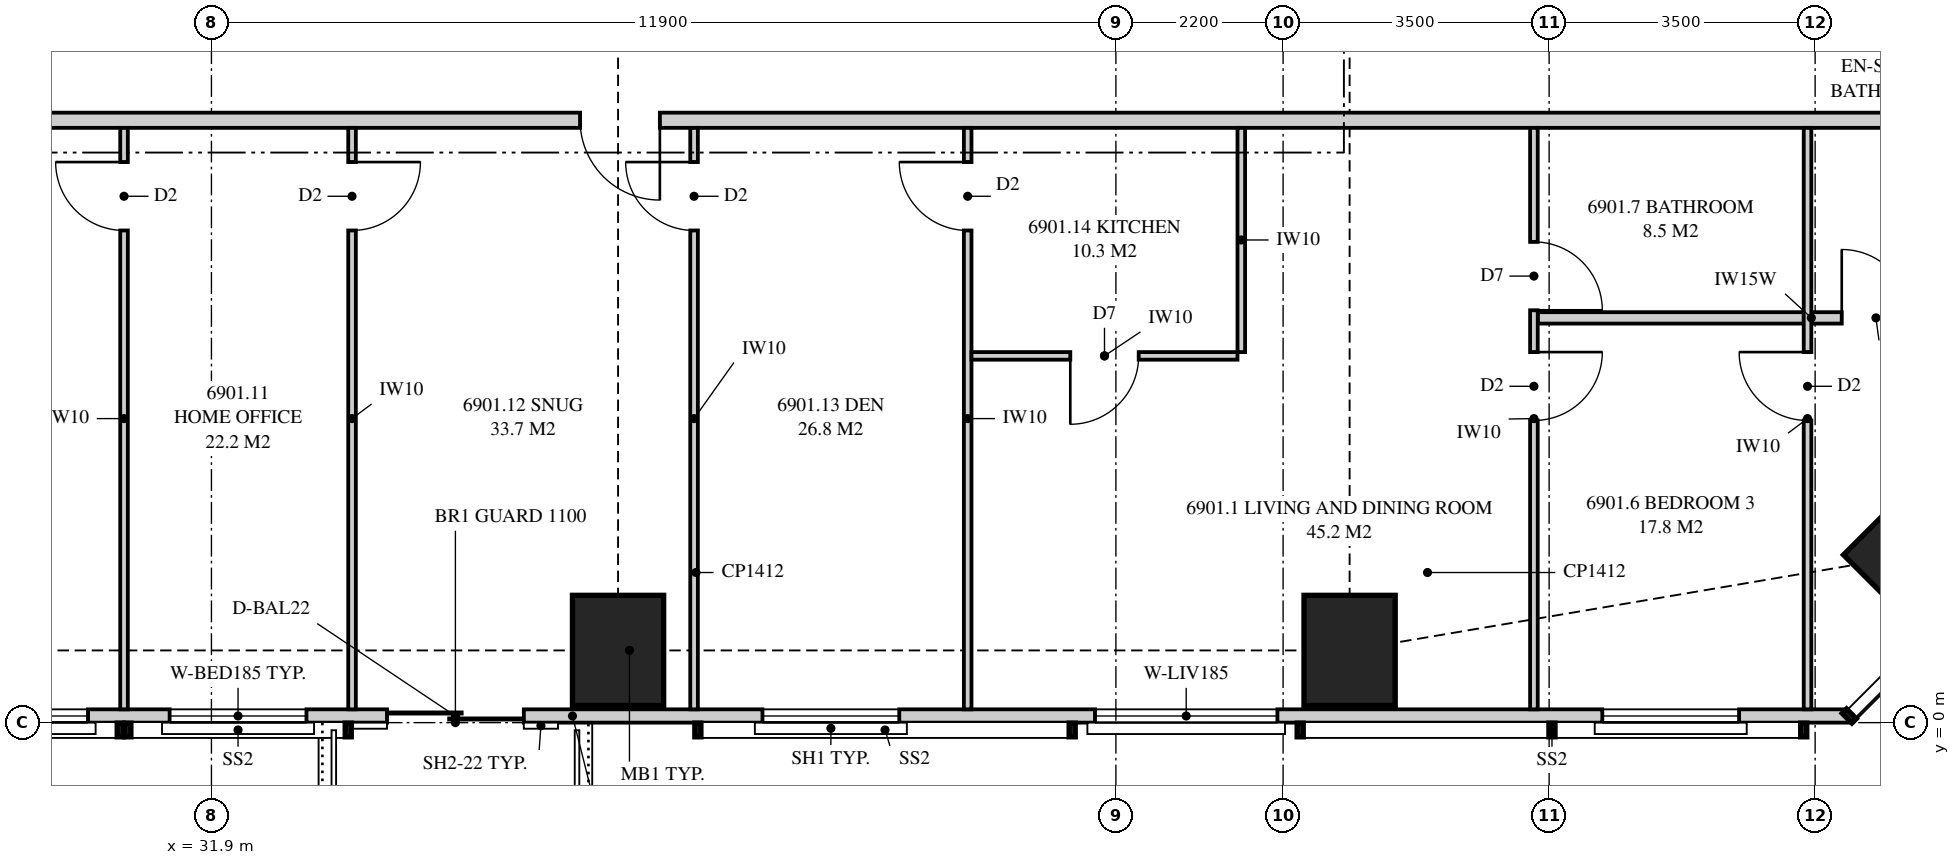
"""IFC4 building model, lengths in metres.
Left out: names, types, materials, properties, quantities, classifications, styles, units other than length and angle.
Written with IfcOpenShell. Run it as: python <this file> out.ifc"""

import sys

from ifc_helpers import new_model, si_unit, direction, frame, frame_2d, origin, origin_2d, place, context, subcontext, project, spatial, polyline, rectangle, outline, extrude, element, fill, save


model = new_model("IFC4")
c1 = context("Model", 3, precision=1e-05, world=origin(), true_north=direction((0.0, 1.0)))
c2 = subcontext(c1, "Body", "Model", "MODEL_VIEW")
j1 = project(units=[si_unit("LENGTHUNIT", "METRE"), si_unit("PLANEANGLEUNIT", "RADIAN")], contexts=[c1])
p1 = place(None, origin())
s1 = spatial("IfcSite", under=j1, at=p1, CompositionType="ELEMENT")
p2 = place(p1, origin())
s2 = spatial("IfcBuilding", under=s1, at=p2, CompositionType="ELEMENT")
p3 = place(p2, frame((0.0, 0.0, 252.95)))
s3 = spatial("IfcBuildingStorey", under=s2, at=p3, CompositionType="ELEMENT", Elevation=252.95)
for number, where, z_axis, x_axis in (
    (1, (37.25, 0.95, 0.0), (0.0, 0.0, 1.0), (0.0, 1.0, 0.0)),
    (2, (46.875, 0.95, 0.0), (0.0, 0.0, 1.0), (0.0, 1.0, 0.0)),
):
    element("IfcColumn", number, at=place(p3, frame(where, z_axis=z_axis, x_axis=x_axis)), inside=s3, PredefinedType="COLUMN", context=c2, shape_type="SweptSolid", body=[
        extrude(rectangle(XDim=1.45, YDim=1.2, at=origin_2d()), origin(), (0.0, 0.0, 1.0), 3.5),
    ])
p4 = place(p3, frame((54.293, 2.207, 0.0), z_axis=(0.0, 0.0, 1.0), x_axis=(0.707106781187, 0.707106781187, 0.0)))
e3 = element("IfcColumn", 3, at=p4, inside=s3, PredefinedType="COLUMN", context=c2, shape_type="SweptSolid", body=[
    extrude(rectangle(XDim=1.3, YDim=1.3, at=origin_2d()), origin(), (0.0, 0.0, 1.0), 3.5),
])
p5 = place(p3, frame((19.851, 0.087, 0.0), z_axis=(0.0, 0.0, 1.0), x_axis=(1.0, 0.0, 0.0)))
e4 = element("IfcWall", 4, at=p5, inside=s3, PredefinedType="SOLIDWALL", context=c2, shape_type="SweptSolid", body=[
    extrude(outline(polyline([(0.0, 0.0), (33.597, 0.0), (33.597, 3.26), (27.239, 3.26), (27.239, 2.3), (27.155, 2.3), (27.155, 3.26), (27.024, 3.26), (27.024, 2.3), (7.774, 2.3), (7.774, 3.26), (7.642, 3.26), (7.642, 2.3), (7.559, 2.3), (7.559, 3.26), (0.0, 3.26), (0.0, 0.0)])), frame((0.0, 0.087, 0.0), z_axis=(0.0, -1.0, 0.0), x_axis=(1.0, 0.0, 0.0)), (0.0, 0.0, 1.0), 0.175),
])
p6 = place(p5, frame((2.649, 0.0, 0.4)))
e5 = element("IfcOpeningElement", 5, at=p6, cuts=e4, PredefinedType="OPENING", context=c2, shape_type="SweptSolid", body=[
    extrude(rectangle(XDim=1.8, YDim=1.85, at=frame_2d((0.9, 0.925))), frame((0.0, 0.097, 0.0), z_axis=(0.0, -1.0, 0.0), x_axis=(1.0, 0.0, 0.0)), (0.0, 0.0, 1.0), 0.195),
])
p7 = place(p5, frame((8.625, 0.0, 0.4)))
e6 = element("IfcOpeningElement", 6, at=p7, cuts=e4, PredefinedType="OPENING", context=c2, shape_type="SweptSolid", body=[
    extrude(rectangle(XDim=1.8, YDim=1.85, at=frame_2d((0.9, 0.925))), frame((0.0, 0.097, 0.0), z_axis=(0.0, -1.0, 0.0), x_axis=(1.0, 0.0, 0.0)), (0.0, 0.0, 1.0), 0.195),
])
p8 = place(p5, frame((11.499, 0.0, 0.4)))
e7 = element("IfcOpeningElement", 7, at=p8, cuts=e4, PredefinedType="OPENING", context=c2, shape_type="SweptSolid", body=[
    extrude(rectangle(XDim=1.8, YDim=1.85, at=frame_2d((0.9, 0.925))), frame((0.0, 0.097, 0.0), z_axis=(0.0, -1.0, 0.0), x_axis=(1.0, 0.0, 0.0)), (0.0, 0.0, 1.0), 0.195),
])
p9 = place(p5, frame((14.359, 0.0, 0.0)))
e8 = element("IfcOpeningElement", 8, at=p9, cuts=e4, PredefinedType="OPENING", context=c2, shape_type="SweptSolid", body=[
    extrude(rectangle(XDim=1.8, YDim=2.25, at=frame_2d((0.9, 1.125))), frame((0.0, 0.097, 0.0), z_axis=(0.0, -1.0, 0.0), x_axis=(1.0, 0.0, 0.0)), (0.0, 0.0, 1.0), 0.195),
])
p10 = place(p5, frame((19.299, 0.0, 0.4)))
e9 = element("IfcOpeningElement", 9, at=p10, cuts=e4, PredefinedType="OPENING", context=c2, shape_type="SweptSolid", body=[
    extrude(rectangle(XDim=1.8, YDim=1.85, at=frame_2d((0.9, 0.925))), frame((0.0, 0.097, 0.0), z_axis=(0.0, -1.0, 0.0), x_axis=(1.0, 0.0, 0.0)), (0.0, 0.0, 1.0), 0.195),
])
p11 = place(p5, frame((23.674, 0.0, 0.4)))
e10 = element("IfcOpeningElement", 10, at=p11, cuts=e4, PredefinedType="OPENING", context=c2, shape_type="SweptSolid", body=[
    extrude(rectangle(XDim=2.4, YDim=1.85, at=frame_2d((1.2, 0.925))), frame((0.0, 0.097, 0.0), z_axis=(0.0, -1.0, 0.0), x_axis=(1.0, 0.0, 0.0)), (0.0, 0.0, 1.0), 0.195),
])
p12 = place(p5, frame((30.349, 0.0, 0.4)))
e11 = element("IfcOpeningElement", 11, at=p12, cuts=e4, PredefinedType="OPENING", context=c2, shape_type="SweptSolid", body=[
    extrude(rectangle(XDim=1.8, YDim=1.85, at=frame_2d((0.9, 0.925))), frame((0.0, 0.097, 0.0), z_axis=(0.0, -1.0, 0.0), x_axis=(1.0, 0.0, 0.0)), (0.0, 0.0, 1.0), 0.195),
])
p13 = place(p3, frame((18.0, 7.925, 0.0), z_axis=(0.0, 0.0, 1.0), x_axis=(1.0, 0.0, 0.0)))
e12 = element("IfcWall", 12, at=p13, inside=s3, PredefinedType="PARTITIONING", context=c2, shape_type="SweptSolid", body=[
    extrude(outline(polyline([(0.0, 0.0), (38.325, 0.0), (38.325, 3.26), (37.875, 3.26), (37.875, 2.3), (36.043, 2.3), (36.043, 3.26), (30.185, 3.26), (30.185, 2.66), (27.565, 2.66), (27.565, 3.26), (20.56, 3.26), (20.56, 2.66), (17.94, 2.66), (17.94, 3.26), (10.935, 3.26), (10.935, 2.66), (8.315, 2.66), (8.315, 3.26), (1.839, 3.26), (1.839, 2.3), (0.0, 2.3), (0.0, 3.26), (0.0, 0.0)])), frame((0.0, 0.1, 0.0), z_axis=(0.0, -1.0, 0.0), x_axis=(1.0, 0.0, 0.0)), (0.0, 0.0, 1.0), 0.2),
])
p14 = place(p13, frame((18.75, 0.0, 0.0)))
e13 = element("IfcOpeningElement", 13, at=p14, cuts=e12, PredefinedType="OPENING", context=c2, shape_type="SweptSolid", body=[
    extrude(rectangle(XDim=1.05, YDim=2.2, at=frame_2d((0.525, 1.1))), frame((0.0, 0.11, 0.0), z_axis=(0.0, -1.0, 0.0), x_axis=(1.0, 0.0, 0.0)), (0.0, 0.0, 1.0), 0.22),
])
p15 = place(p3, frame((49.3, 0.175, 0.0), z_axis=(0.0, 0.0, 1.0), x_axis=(0.0, 1.0, 0.0)))
e14 = element("IfcWall", 14, at=p15, inside=s3, PredefinedType="PARTITIONING", context=c2, shape_type="SweptSolid", body=[
    extrude(outline(polyline([(0.0, 0.0), (7.65, 0.0), (7.65, 3.26), (2.058, 3.26), (2.058, 2.3), (0.314, 2.3), (0.314, 3.26), (0.0, 3.26), (0.0, 0.0)])), frame((0.0, 0.05, 0.0), z_axis=(0.0, -1.0, 0.0), x_axis=(1.0, 0.0, 0.0)), (0.0, 0.0, 1.0), 0.1),
])
p16 = place(p15, frame((3.8, 0.0, 0.0)))
e15 = element("IfcOpeningElement", 15, at=p16, cuts=e14, PredefinedType="OPENING", context=c2, shape_type="SweptSolid", body=[
    extrude(rectangle(XDim=0.9, YDim=2.1, at=frame_2d((0.45, 1.05))), frame((0.0, 0.06, 0.0), z_axis=(0.0, -1.0, 0.0), x_axis=(1.0, 0.0, 0.0)), (0.0, 0.0, 1.0), 0.12),
])
p17 = place(p15, frame((5.25, 0.0, 0.0)))
e16 = element("IfcOpeningElement", 16, at=p17, cuts=e14, PredefinedType="OPENING", context=c2, shape_type="SweptSolid", body=[
    extrude(rectangle(XDim=0.9, YDim=2.1, at=frame_2d((0.45, 1.05))), frame((0.0, 0.06, 0.0), z_axis=(0.0, -1.0, 0.0), x_axis=(1.0, 0.0, 0.0)), (0.0, 0.0, 1.0), 0.12),
])
p18 = place(p3, frame((52.9, 0.175, 0.0), z_axis=(0.0, 0.0, 1.0), x_axis=(0.0, 1.0, 0.0)))
e17 = element("IfcWall", 17, at=p18, inside=s3, PredefinedType="PARTITIONING", context=c2, shape_type="SweptSolid", body=[
    extrude(outline(polyline([(0.0, 0.0), (7.65, 0.0), (7.65, 3.26), (2.668, 3.26), (2.668, 2.3), (0.924, 2.3), (0.924, 3.26), (0.0, 3.26), (0.0, 0.0)])), frame((0.0, 0.05, 0.0), z_axis=(0.0, -1.0, 0.0), x_axis=(1.0, 0.0, 0.0)), (0.0, 0.0, 1.0), 0.1),
])
p19 = place(p18, frame((3.8, 0.0, 0.0)))
e18 = element("IfcOpeningElement", 18, at=p19, cuts=e17, PredefinedType="OPENING", context=c2, shape_type="SweptSolid", body=[
    extrude(rectangle(XDim=0.9, YDim=2.1, at=frame_2d((0.45, 1.05))), frame((0.0, 0.06, 0.0), z_axis=(0.0, -1.0, 0.0), x_axis=(1.0, 0.0, 0.0)), (0.0, 0.0, 1.0), 0.12),
])
p20 = place(p3, frame((49.35, 5.325, 0.0), z_axis=(0.0, 0.0, 1.0), x_axis=(1.0, 0.0, 0.0)))
e19 = element("IfcWall", 19, at=p20, inside=s3, PredefinedType="PLUMBINGWALL", context=c2, shape_type="SweptSolid", body=[
    extrude(rectangle(XDim=3.5, YDim=0.15, at=frame_2d((1.75, 0.0))), origin(), (0.0, 0.0, 1.0), 3.26),
])
p21 = place(p3, frame((52.95, 5.325, 0.0), z_axis=(0.0, 0.0, 1.0), x_axis=(1.0, 0.0, 0.0)))
e20 = element("IfcWall", 20, at=p21, inside=s3, PredefinedType="PLUMBINGWALL", context=c2, shape_type="SweptSolid", body=[
    extrude(outline(polyline([(0.0, 0.0), (3.55, 0.0), (3.55, 3.26), (2.597, 3.26), (2.597, 2.3), (0.815, 2.3), (0.815, 3.26), (0.0, 3.26), (0.0, 0.0)])), frame((0.0, 0.075, 0.0), z_axis=(0.0, -1.0, 0.0), x_axis=(1.0, 0.0, 0.0)), (0.0, 0.0, 1.0), 0.15),
])
p22 = place(p21, frame((0.4, 0.0, 0.0)))
e21 = element("IfcOpeningElement", 21, at=p22, cuts=e20, PredefinedType="OPENING", context=c2, shape_type="SweptSolid", body=[
    extrude(rectangle(XDim=0.9, YDim=2.1, at=frame_2d((0.45, 1.05))), frame((0.0, 0.085, 0.0), z_axis=(0.0, -1.0, 0.0), x_axis=(1.0, 0.0, 0.0)), (0.0, 0.0, 1.0), 0.17),
])
p23 = place(p3, frame((30.75, 0.175, 0.0), z_axis=(0.0, 0.0, 1.0), x_axis=(0.0, 1.0, 0.0)))
e22 = element("IfcWall", 22, at=p23, inside=s3, PredefinedType="PARTITIONING", context=c2, shape_type="SweptSolid", body=[
    extrude(outline(polyline([(0.0, 0.0), (7.65, 0.0), (7.65, 3.26), (1.635, 3.26), (1.635, 2.3), (0.0, 2.3), (0.0, 3.26), (0.0, 0.0)])), frame((0.0, 0.05, 0.0), z_axis=(0.0, -1.0, 0.0), x_axis=(1.0, 0.0, 0.0)), (0.0, 0.0, 1.0), 0.1),
])
p24 = place(p23, frame((6.3, 0.0, 0.0)))
e23 = element("IfcOpeningElement", 23, at=p24, cuts=e22, PredefinedType="OPENING", context=c2, shape_type="SweptSolid", body=[
    extrude(rectangle(XDim=0.9, YDim=2.1, at=frame_2d((0.45, 1.05))), frame((0.0, 0.06, 0.0), z_axis=(0.0, -1.0, 0.0), x_axis=(1.0, 0.0, 0.0)), (0.0, 0.0, 1.0), 0.12),
])
p25 = place(p3, frame((33.75, 0.175, 0.0), z_axis=(0.0, 0.0, 1.0), x_axis=(0.0, 1.0, 0.0)))
e24 = element("IfcWall", 24, at=p25, inside=s3, PredefinedType="PARTITIONING", context=c2, shape_type="SweptSolid", body=[
    extrude(outline(polyline([(0.0, 0.0), (7.65, 0.0), (7.65, 3.26), (1.635, 3.26), (1.635, 2.3), (0.0, 2.3), (0.0, 3.26), (0.0, 0.0)])), frame((0.0, 0.05, 0.0), z_axis=(0.0, -1.0, 0.0), x_axis=(1.0, 0.0, 0.0)), (0.0, 0.0, 1.0), 0.1),
])
p26 = place(p25, frame((6.3, 0.0, 0.0)))
e25 = element("IfcOpeningElement", 25, at=p26, cuts=e24, PredefinedType="OPENING", context=c2, shape_type="SweptSolid", body=[
    extrude(rectangle(XDim=0.9, YDim=2.1, at=frame_2d((0.45, 1.05))), frame((0.0, 0.06, 0.0), z_axis=(0.0, -1.0, 0.0), x_axis=(1.0, 0.0, 0.0)), (0.0, 0.0, 1.0), 0.12),
])
p27 = place(p3, frame((38.25, 0.175, 0.0), z_axis=(0.0, 0.0, 1.0), x_axis=(0.0, 1.0, 0.0)))
e26 = element("IfcWall", 26, at=p27, inside=s3, PredefinedType="PARTITIONING", context=c2, shape_type="SweptSolid", body=[
    extrude(outline(polyline([(0.0, 0.0), (7.65, 0.0), (7.65, 3.26), (7.65, 2.66), (1.635, 2.66), (1.635, 2.3), (0.0, 2.3), (0.0, 3.26), (0.0, 0.0)])), frame((0.0, 0.05, 0.0), z_axis=(0.0, -1.0, 0.0), x_axis=(1.0, 0.0, 0.0)), (0.0, 0.0, 1.0), 0.1),
])
p28 = place(p27, frame((6.3, 0.0, 0.0)))
e27 = element("IfcOpeningElement", 27, at=p28, cuts=e26, PredefinedType="OPENING", context=c2, shape_type="SweptSolid", body=[
    extrude(rectangle(XDim=0.9, YDim=2.1, at=frame_2d((0.45, 1.05))), frame((0.0, 0.06, 0.0), z_axis=(0.0, -1.0, 0.0), x_axis=(1.0, 0.0, 0.0)), (0.0, 0.0, 1.0), 0.12),
])
p29 = place(p3, frame((41.85, 0.175, 0.0), z_axis=(0.0, 0.0, 1.0), x_axis=(0.0, 1.0, 0.0)))
e28 = element("IfcWall", 28, at=p29, inside=s3, PredefinedType="PARTITIONING", context=c2, shape_type="SweptSolid", body=[
    extrude(outline(polyline([(0.0, 0.0), (7.65, 0.0), (7.65, 3.26), (1.635, 3.26), (1.635, 2.3), (0.0, 2.3), (0.0, 3.26), (0.0, 0.0)])), frame((0.0, 0.05, 0.0), z_axis=(0.0, -1.0, 0.0), x_axis=(1.0, 0.0, 0.0)), (0.0, 0.0, 1.0), 0.1),
])
p30 = place(p29, frame((6.3, 0.0, 0.0)))
e29 = element("IfcOpeningElement", 29, at=p30, cuts=e28, PredefinedType="OPENING", context=c2, shape_type="SweptSolid", body=[
    extrude(rectangle(XDim=0.9, YDim=2.1, at=frame_2d((0.45, 1.05))), frame((0.0, 0.06, 0.0), z_axis=(0.0, -1.0, 0.0), x_axis=(1.0, 0.0, 0.0)), (0.0, 0.0, 1.0), 0.12),
])
p31 = place(p3, frame((41.9, 4.825, 0.0), z_axis=(0.0, 0.0, 1.0), x_axis=(1.0, 0.0, 0.0)))
e30 = element("IfcWall", 30, at=p31, inside=s3, PredefinedType="PARTITIONING", context=c2, shape_type="SweptSolid", body=[
    extrude(rectangle(XDim=3.5, YDim=0.1, at=frame_2d((1.75, 0.0))), origin(), (0.0, 0.0, 1.0), 3.26),
])
p32 = place(p31, frame((1.3, 0.0, 0.0)))
e31 = element("IfcOpeningElement", 31, at=p32, cuts=e30, PredefinedType="OPENING", context=c2, shape_type="SweptSolid", body=[
    extrude(rectangle(XDim=0.9, YDim=2.1, at=frame_2d((0.45, 1.05))), frame((0.0, 0.06, 0.0), z_axis=(0.0, -1.0, 0.0), x_axis=(1.0, 0.0, 0.0)), (0.0, 0.0, 1.0), 0.12),
])
p33 = place(p3, frame((45.45, 4.875, 0.0), z_axis=(0.0, 0.0, 1.0), x_axis=(0.0, 1.0, 0.0)))
e32 = element("IfcWall", 32, at=p33, inside=s3, PredefinedType="PARTITIONING", context=c2, shape_type="SweptSolid", body=[
    extrude(rectangle(XDim=2.95, YDim=0.1, at=frame_2d((1.475, 0.0))), origin(), (0.0, 0.0, 1.0), 3.26),
])
p34 = place(p7, origin())
e33 = element("IfcWindow", 33, at=p34, inside=s3, PartitioningType="SINGLE_PANEL", PredefinedType="WINDOW", context=c2, shape_type="SweptSolid", body=[
    extrude(rectangle(XDim=1.8, YDim=1.85, at=frame_2d((0.9, 0.925))), frame((0.0, 0.03, 0.0), z_axis=(0.0, -1.0, 0.0), x_axis=(1.0, 0.0, 0.0)), (0.0, 0.0, 1.0), 0.06),
])
fill(e6, e33)
p35 = place(p8, origin())
e34 = element("IfcWindow", 34, at=p35, inside=s3, PartitioningType="SINGLE_PANEL", PredefinedType="WINDOW", context=c2, shape_type="SweptSolid", body=[
    extrude(rectangle(XDim=1.8, YDim=1.85, at=frame_2d((0.9, 0.925))), frame((0.0, 0.03, 0.0), z_axis=(0.0, -1.0, 0.0), x_axis=(1.0, 0.0, 0.0)), (0.0, 0.0, 1.0), 0.06),
])
fill(e7, e34)
p36 = place(p9, origin())
e35 = element("IfcDoor", 35, at=p36, inside=s3, OperationType="SLIDING_TO_LEFT", PredefinedType="DOOR", context=c2, shape_type="SweptSolid", body=[
    extrude(rectangle(XDim=1.8, YDim=2.25, at=frame_2d((0.9, 1.125))), frame((0.0, 0.025, 0.0), z_axis=(0.0, -1.0, 0.0), x_axis=(1.0, 0.0, 0.0)), (0.0, 0.0, 1.0), 0.05),
])
fill(e8, e35)
p37 = place(p10, origin())
e36 = element("IfcWindow", 36, at=p37, inside=s3, PartitioningType="SINGLE_PANEL", PredefinedType="WINDOW", context=c2, shape_type="SweptSolid", body=[
    extrude(rectangle(XDim=1.8, YDim=1.85, at=frame_2d((0.9, 0.925))), frame((0.0, 0.03, 0.0), z_axis=(0.0, -1.0, 0.0), x_axis=(1.0, 0.0, 0.0)), (0.0, 0.0, 1.0), 0.06),
])
fill(e9, e36)
p38 = place(p11, origin())
e37 = element("IfcWindow", 37, at=p38, inside=s3, PartitioningType="SINGLE_PANEL", PredefinedType="WINDOW", context=c2, shape_type="SweptSolid", body=[
    extrude(rectangle(XDim=2.4, YDim=1.85, at=frame_2d((1.2, 0.925))), frame((0.0, 0.03, 0.0), z_axis=(0.0, -1.0, 0.0), x_axis=(1.0, 0.0, 0.0)), (0.0, 0.0, 1.0), 0.06),
])
fill(e10, e37)
p39 = place(p12, origin())
e38 = element("IfcWindow", 38, at=p39, inside=s3, PartitioningType="SINGLE_PANEL", PredefinedType="WINDOW", context=c2, shape_type="SweptSolid", body=[
    extrude(rectangle(XDim=1.8, YDim=1.85, at=frame_2d((0.9, 0.925))), frame((0.0, 0.03, 0.0), z_axis=(0.0, -1.0, 0.0), x_axis=(1.0, 0.0, 0.0)), (0.0, 0.0, 1.0), 0.06),
])
fill(e11, e38)
p40 = place(p14, frame((1.05, 0.0, 0.0), z_axis=(0.0, 0.0, 1.0), x_axis=(-1.0, 0.0, 0.0)))
e39 = element("IfcDoor", 39, at=p40, inside=s3, OperationType="SINGLE_SWING_LEFT", PredefinedType="DOOR", context=c2, shape_type="SweptSolid", body=[
    extrude(rectangle(XDim=1.05, YDim=2.2, at=frame_2d((0.525, 1.1))), frame((0.0, 0.025, 0.0), z_axis=(0.0, -1.0, 0.0), x_axis=(1.0, 0.0, 0.0)), (0.0, 0.0, 1.0), 0.05),
])
fill(e13, e39)
p41 = place(p16, frame((0.9, 0.0, 0.0), z_axis=(0.0, 0.0, 1.0), x_axis=(-1.0, 0.0, 0.0)))
e40 = element("IfcDoor", 40, at=p41, inside=s3, OperationType="SINGLE_SWING_LEFT", PredefinedType="DOOR", context=c2, shape_type="SweptSolid", body=[
    extrude(rectangle(XDim=0.9, YDim=2.1, at=frame_2d((0.45, 1.05))), frame((0.0, 0.025, 0.0), z_axis=(0.0, -1.0, 0.0), x_axis=(1.0, 0.0, 0.0)), (0.0, 0.0, 1.0), 0.05),
])
fill(e15, e40)
p42 = place(p17, frame((0.9, 0.0, 0.0), z_axis=(0.0, 0.0, 1.0), x_axis=(-1.0, 0.0, 0.0)))
e41 = element("IfcDoor", 41, at=p42, inside=s3, OperationType="SINGLE_SWING_RIGHT", PredefinedType="DOOR", context=c2, shape_type="SweptSolid", body=[
    extrude(rectangle(XDim=0.9, YDim=2.1, at=frame_2d((0.45, 1.05))), frame((0.0, 0.025, 0.0), z_axis=(0.0, -1.0, 0.0), x_axis=(1.0, 0.0, 0.0)), (0.0, 0.0, 1.0), 0.05),
])
fill(e16, e41)
p43 = place(p19, origin())
e42 = element("IfcDoor", 42, at=p43, inside=s3, OperationType="SINGLE_SWING_RIGHT", PredefinedType="DOOR", context=c2, shape_type="SweptSolid", body=[
    extrude(rectangle(XDim=0.9, YDim=2.1, at=frame_2d((0.45, 1.05))), frame((0.0, 0.025, 0.0), z_axis=(0.0, -1.0, 0.0), x_axis=(1.0, 0.0, 0.0)), (0.0, 0.0, 1.0), 0.05),
])
fill(e18, e42)
p44 = place(p22, origin())
e43 = element("IfcDoor", 43, at=p44, inside=s3, OperationType="SINGLE_SWING_LEFT", PredefinedType="DOOR", context=c2, shape_type="SweptSolid", body=[
    extrude(rectangle(XDim=0.9, YDim=2.1, at=frame_2d((0.45, 1.05))), frame((0.0, 0.025, 0.0), z_axis=(0.0, -1.0, 0.0), x_axis=(1.0, 0.0, 0.0)), (0.0, 0.0, 1.0), 0.05),
])
fill(e21, e43)
p45 = place(p24, origin())
e44 = element("IfcDoor", 44, at=p45, inside=s3, OperationType="SINGLE_SWING_RIGHT", PredefinedType="DOOR", context=c2, shape_type="SweptSolid", body=[
    extrude(rectangle(XDim=0.9, YDim=2.1, at=frame_2d((0.45, 1.05))), frame((0.0, 0.025, 0.0), z_axis=(0.0, -1.0, 0.0), x_axis=(1.0, 0.0, 0.0)), (0.0, 0.0, 1.0), 0.05),
])
fill(e23, e44)
p46 = place(p26, frame((0.9, 0.0, 0.0), z_axis=(0.0, 0.0, 1.0), x_axis=(-1.0, 0.0, 0.0)))
e45 = element("IfcDoor", 45, at=p46, inside=s3, OperationType="SINGLE_SWING_LEFT", PredefinedType="DOOR", context=c2, shape_type="SweptSolid", body=[
    extrude(rectangle(XDim=0.9, YDim=2.1, at=frame_2d((0.45, 1.05))), frame((0.0, 0.025, 0.0), z_axis=(0.0, -1.0, 0.0), x_axis=(1.0, 0.0, 0.0)), (0.0, 0.0, 1.0), 0.05),
])
fill(e25, e45)
p47 = place(p28, origin())
e46 = element("IfcDoor", 46, at=p47, inside=s3, OperationType="SINGLE_SWING_RIGHT", PredefinedType="DOOR", context=c2, shape_type="SweptSolid", body=[
    extrude(rectangle(XDim=0.9, YDim=2.1, at=frame_2d((0.45, 1.05))), frame((0.0, 0.025, 0.0), z_axis=(0.0, -1.0, 0.0), x_axis=(1.0, 0.0, 0.0)), (0.0, 0.0, 1.0), 0.05),
])
fill(e27, e46)
p48 = place(p30, origin())
e47 = element("IfcDoor", 47, at=p48, inside=s3, OperationType="SINGLE_SWING_RIGHT", PredefinedType="DOOR", context=c2, shape_type="SweptSolid", body=[
    extrude(rectangle(XDim=0.9, YDim=2.1, at=frame_2d((0.45, 1.05))), frame((0.0, 0.025, 0.0), z_axis=(0.0, -1.0, 0.0), x_axis=(1.0, 0.0, 0.0)), (0.0, 0.0, 1.0), 0.05),
])
fill(e29, e47)
p49 = place(p32, frame((0.9, 0.0, 0.0), z_axis=(0.0, 0.0, 1.0), x_axis=(-1.0, 0.0, 0.0)))
e48 = element("IfcDoor", 48, at=p49, inside=s3, OperationType="SINGLE_SWING_RIGHT", PredefinedType="DOOR", context=c2, shape_type="SweptSolid", body=[
    extrude(rectangle(XDim=0.9, YDim=2.1, at=frame_2d((0.45, 1.05))), frame((0.0, 0.025, 0.0), z_axis=(0.0, -1.0, 0.0), x_axis=(1.0, 0.0, 0.0)), (0.0, 0.0, 1.0), 0.05),
])
fill(e31, e48)
save(model, sys.argv[1])
